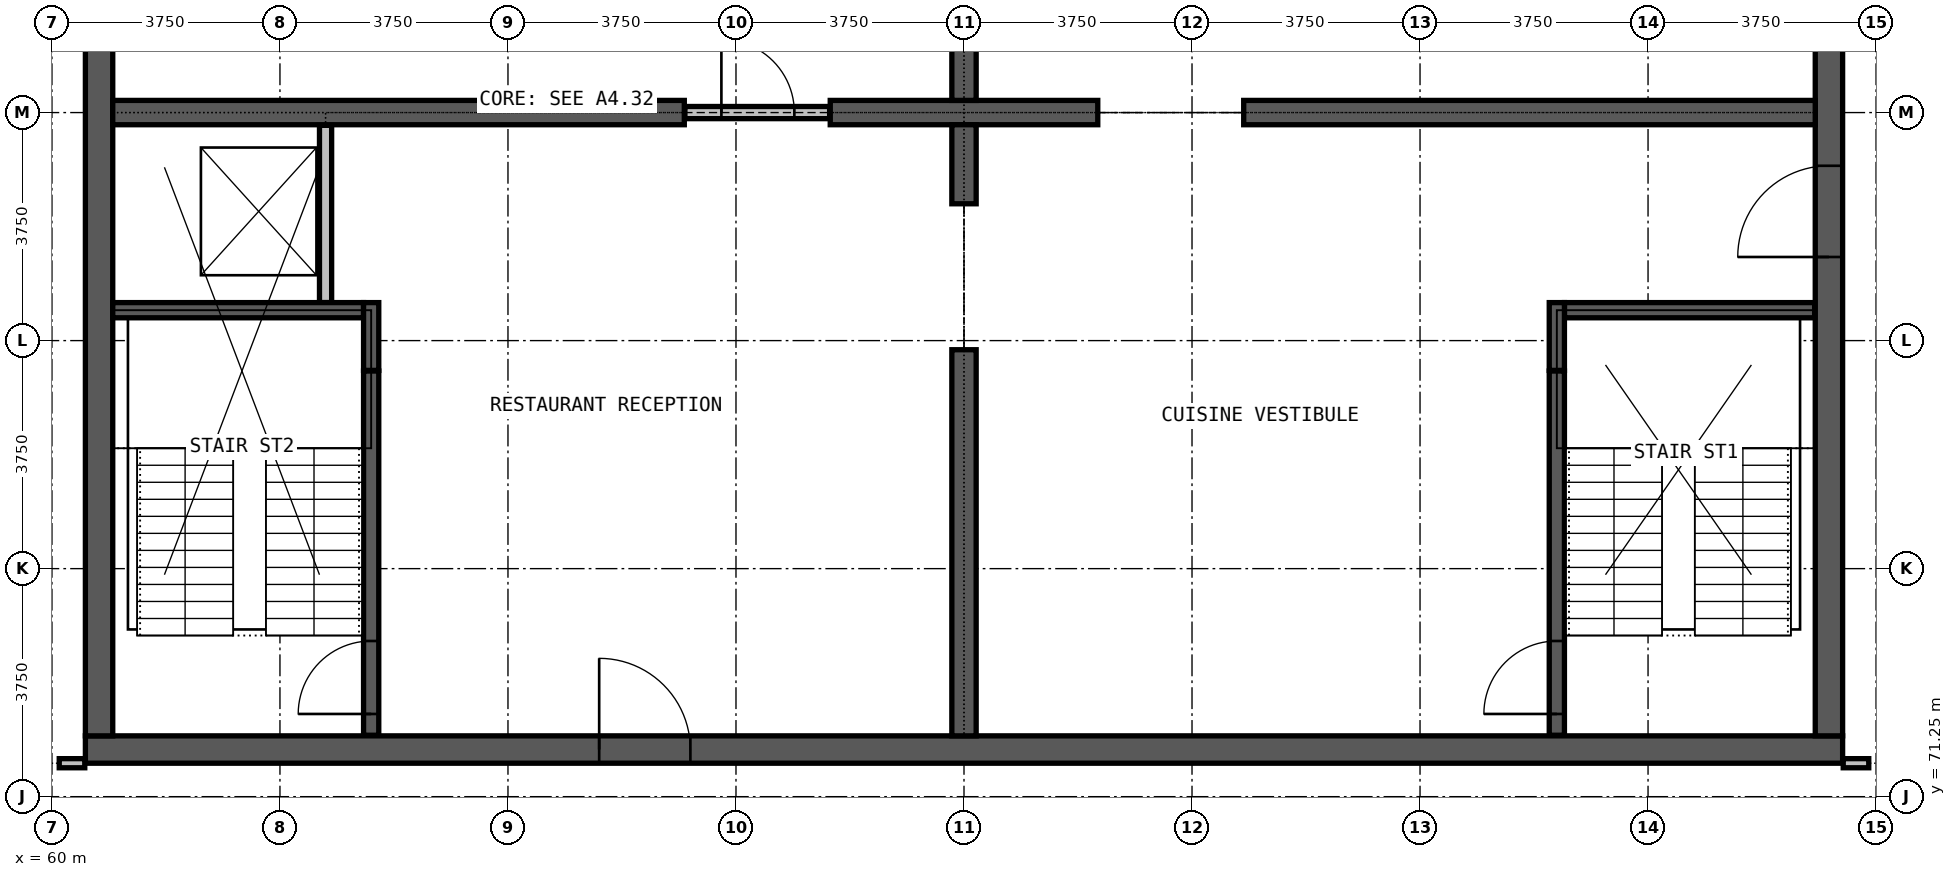
"""IFC4 building model, lengths in metres.
Left out: names, types, materials, properties, quantities, classifications, styles, units other than length and angle.
Written with IfcOpenShell. Run it as: python <this file> out.ifc"""

import sys

from ifc_helpers import new_model, si_unit, direction, frame, frame_2d, origin, place, context, subcontext, project, spatial, rectangle, extrude, element, fill, save


model = new_model("IFC4")
c1 = context("Model", 3, precision=1e-05, world=origin(), true_north=direction((0.0, 1.0)))
c2 = subcontext(c1, "Body", "Model", "MODEL_VIEW")
j1 = project(units=[si_unit("LENGTHUNIT", "METRE"), si_unit("PLANEANGLEUNIT", "RADIAN")], contexts=[c1])
p1 = place(None, origin())
s1 = spatial("IfcSite", under=j1, at=p1, CompositionType="ELEMENT")
p2 = place(p1, origin())
s2 = spatial("IfcBuilding", under=s1, at=p2, CompositionType="ELEMENT")
p3 = place(p2, frame((0.0, 0.0, 283.7)))
s3 = spatial("IfcBuildingStorey", under=s2, at=p3, CompositionType="ELEMENT", Elevation=283.7)
p4 = place(p3, frame((60.55, 72.025, 0.0), z_axis=(0.0, 0.0, 1.0), x_axis=(1.0, 0.0, 0.0)))
e1 = element("IfcWall", 1, at=p4, inside=s3, PredefinedType="SHEAR", context=c2, shape_type="SweptSolid", body=[
    extrude(rectangle(XDim=28.9, YDim=0.45, at=frame_2d((14.45, 0.0))), origin(), (0.0, 0.0, 1.0), 4.0),
])
p5 = place(p4, frame((8.45, 0.0, 0.0)))
e2 = element("IfcOpeningElement", 2, at=p5, cuts=e1, PredefinedType="OPENING", context=c2, shape_type="SweptSolid", body=[
    extrude(rectangle(XDim=1.5, YDim=2.2, at=frame_2d((0.75, 1.1))), frame((0.0, 0.235, 0.0), z_axis=(0.0, -1.0, 0.0), x_axis=(1.0, 0.0, 0.0)), (0.0, 0.0, 1.0), 0.47),
])
p6 = place(p3, frame((89.225, 72.25, 0.0), z_axis=(0.0, 0.0, 1.0), x_axis=(0.0, 1.0, 0.0)))
e3 = element("IfcWall", 3, at=p6, inside=s3, PredefinedType="SHEAR", context=c2, shape_type="SweptSolid", body=[
    extrude(rectangle(XDim=20.5, YDim=0.45, at=frame_2d((10.25, 0.0))), origin(), (0.0, 0.0, 1.0), 4.0),
])
p7 = place(p6, frame((7.875, 0.0, 0.0)))
e4 = element("IfcOpeningElement", 4, at=p7, cuts=e3, PredefinedType="OPENING", context=c2, shape_type="SweptSolid", body=[
    extrude(rectangle(XDim=1.5, YDim=2.2, at=frame_2d((0.75, 1.1))), frame((0.0, 0.235, 0.0), z_axis=(0.0, -1.0, 0.0), x_axis=(1.0, 0.0, 0.0)), (0.0, 0.0, 1.0), 0.47),
])
p8 = place(p3, frame((60.775, 92.75, 0.0), z_axis=(0.0, 0.0, 1.0), x_axis=(0.0, -1.0, 0.0)))
e5 = element("IfcWall", 5, at=p8, inside=s3, PredefinedType="SHEAR", context=c2, shape_type="SweptSolid", body=[
    extrude(rectangle(XDim=20.5, YDim=0.45, at=frame_2d((10.25, 0.0))), origin(), (0.0, 0.0, 1.0), 4.0),
])
p9 = place(p8, frame((8.025, 0.0, 0.0)))
e6 = element("IfcOpeningElement", 6, at=p9, cuts=e5, PredefinedType="OPENING", context=c2, shape_type="SweptSolid", body=[
    extrude(rectangle(XDim=1.2, YDim=2.2, at=frame_2d((0.6, 1.1))), frame((0.0, 0.235, 0.0), z_axis=(0.0, -1.0, 0.0), x_axis=(1.0, 0.0, 0.0)), (0.0, 0.0, 1.0), 0.47),
])
p10 = place(p3, frame((61.0, 82.5, 0.0), z_axis=(0.0, 0.0, 1.0), x_axis=(1.0, 0.0, 0.0)))
e7 = element("IfcWall", 7, at=p10, inside=s3, PredefinedType="SHEAR", context=c2, shape_type="SweptSolid", body=[
    extrude(rectangle(XDim=9.4, YDim=0.4, at=frame_2d((4.7, 0.0))), origin(), (0.0, 0.0, 1.0), 4.0),
])
p11 = place(p3, frame((72.8, 82.5, 0.0), z_axis=(0.0, 0.0, 1.0), x_axis=(1.0, 0.0, 0.0)))
e8 = element("IfcWall", 8, at=p11, inside=s3, PredefinedType="SHEAR", context=c2, shape_type="SweptSolid", body=[
    extrude(rectangle(XDim=4.4, YDim=0.4, at=frame_2d((2.2, 0.0))), origin(), (0.0, 0.0, 1.0), 4.0),
])
p12 = place(p3, frame((79.6, 82.5, 0.0), z_axis=(0.0, 0.0, 1.0), x_axis=(1.0, 0.0, 0.0)))
e9 = element("IfcWall", 9, at=p12, inside=s3, PredefinedType="SHEAR", context=c2, shape_type="SweptSolid", body=[
    extrude(rectangle(XDim=9.4, YDim=0.4, at=frame_2d((4.7, 0.0))), origin(), (0.0, 0.0, 1.0), 4.0),
])
p13 = place(p3, frame((75.0, 72.25, 0.0), z_axis=(0.0, 0.0, 1.0), x_axis=(0.0, 1.0, 0.0)))
e10 = element("IfcWall", 10, at=p13, inside=s3, PredefinedType="SHEAR", context=c2, shape_type="SweptSolid", body=[
    extrude(rectangle(XDim=6.35, YDim=0.4, at=frame_2d((3.175, 0.0))), origin(), (0.0, 0.0, 1.0), 4.0),
])
for number, where, z_axis, x_axis in (
    (11, (75.0, 81.0, 0.0), (0.0, 0.0, 1.0), (0.0, 1.0, 0.0)),
    (12, (75.0, 82.7, 0.0), (0.0, 0.0, 1.0), (0.0, 1.0, 0.0)),
):
    element("IfcWall", number, at=place(p3, frame(where, z_axis=z_axis, x_axis=x_axis)), inside=s3, PredefinedType="SHEAR", context=c2, shape_type="SweptSolid", body=[
        extrude(rectangle(XDim=1.3, YDim=0.4, at=frame_2d((0.65, 0.0))), origin(), (0.0, 0.0, 1.0), 4.0),
    ])
p14 = place(p3, frame((70.41, 82.5, 0.0), z_axis=(0.0, 0.0, 1.0), x_axis=(1.0, 0.0, 0.0)))
e13 = element("IfcWall", 13, at=p14, inside=s3, PredefinedType="PARTITIONING", context=c2, shape_type="SweptSolid", body=[
    extrude(rectangle(XDim=2.38, YDim=0.2, at=frame_2d((1.19, 0.0))), origin(), (0.0, 0.0, 1.0), 2.4),
])
p15 = place(p14, frame((0.6, 0.0, 0.0)))
e14 = element("IfcOpeningElement", 14, at=p15, cuts=e13, PredefinedType="OPENING", context=c2, shape_type="SweptSolid", body=[
    extrude(rectangle(XDim=1.2, YDim=2.2, at=frame_2d((0.6, 1.1))), frame((0.0, 0.11, 0.0), z_axis=(0.0, -1.0, 0.0), x_axis=(1.0, 0.0, 0.0)), (0.0, 0.0, 1.0), 0.22),
])
for number, where, z_axis, x_axis in (
    (15, (60.12, 71.8, 0.0), (0.0, 0.0, 1.0), (1.0, 0.0, 0.0)),
    (16, (89.46, 71.8, 0.0), (0.0, 0.0, 1.0), (1.0, 0.0, 0.0)),
):
    element("IfcWall", number, at=place(p3, frame(where, z_axis=z_axis, x_axis=x_axis)), inside=s3, PredefinedType="PARTITIONING", context=c2, shape_type="SweptSolid", body=[
        extrude(rectangle(XDim=0.42, YDim=0.15, at=frame_2d((0.21, 0.0))), origin(), (0.0, 0.0, 1.0), 3.65),
    ])
p16 = place(p3, frame((64.5, 79.375, 0.0), z_axis=(0.0, 0.0, 1.0), x_axis=(0.0, 1.0, 0.0)))
e17 = element("IfcWall", 17, at=p16, inside=s3, PredefinedType="PARTITIONING", context=c2, shape_type="SweptSolid", body=[
    extrude(rectangle(XDim=2.915, YDim=0.2, at=frame_2d((1.458, 0.0))), origin(), (0.0, 0.0, 1.0), 3.65),
])
p17 = place(p3, frame((61.0, 79.25, 0.0), z_axis=(0.0, 0.0, 1.0), x_axis=(1.0, 0.0, 0.0)))
e18 = element("IfcWall", 18, at=p17, inside=s3, PredefinedType="PARTITIONING", context=c2, shape_type="SweptSolid", body=[
    extrude(rectangle(XDim=4.125, YDim=0.25, at=frame_2d((2.062, 0.0))), origin(), (0.0, 0.0, 1.0), 3.65),
])
p18 = place(p3, frame((84.875, 79.25, 0.0), z_axis=(0.0, 0.0, 1.0), x_axis=(1.0, 0.0, 0.0)))
e19 = element("IfcWall", 19, at=p18, inside=s3, PredefinedType="PARTITIONING", context=c2, shape_type="SweptSolid", body=[
    extrude(rectangle(XDim=4.115, YDim=0.25, at=frame_2d((2.058, 0.0))), origin(), (0.0, 0.0, 1.0), 3.65),
])
p19 = place(p3, frame((65.25, 72.26, 0.0), z_axis=(0.0, 0.0, 1.0), x_axis=(0.0, 1.0, 0.0)))
e20 = element("IfcWall", 20, at=p19, inside=s3, PredefinedType="PARTITIONING", context=c2, shape_type="SweptSolid", body=[
    extrude(rectangle(XDim=5.99, YDim=0.25, at=frame_2d((2.995, 0.0))), origin(), (0.0, 0.0, 1.0), 3.65),
])
p20 = place(p19, frame((0.35, 0.0, 0.0)))
e21 = element("IfcOpeningElement", 21, at=p20, cuts=e20, PredefinedType="OPENING", context=c2, shape_type="SweptSolid", body=[
    extrude(rectangle(XDim=1.2, YDim=2.2, at=frame_2d((0.6, 1.1))), frame((0.0, 0.135, 0.0), z_axis=(0.0, -1.0, 0.0), x_axis=(1.0, 0.0, 0.0)), (0.0, 0.0, 1.0), 0.27),
])
p21 = place(p3, frame((65.25, 78.26, 0.0), z_axis=(0.0, 0.0, 1.0), x_axis=(0.0, 1.0, 0.0)))
e22 = element("IfcWall", 22, at=p21, inside=s3, PredefinedType="PARTITIONING", context=c2, shape_type="SweptSolid", body=[
    extrude(rectangle(XDim=1.115, YDim=0.25, at=frame_2d((0.558, 0.0))), origin(), (0.0, 0.0, 1.0), 3.65),
])
p22 = place(p3, frame((84.75, 72.26, 0.0), z_axis=(0.0, 0.0, 1.0), x_axis=(0.0, 1.0, 0.0)))
e23 = element("IfcWall", 23, at=p22, inside=s3, PredefinedType="PARTITIONING", context=c2, shape_type="SweptSolid", body=[
    extrude(rectangle(XDim=5.99, YDim=0.25, at=frame_2d((2.995, 0.0))), origin(), (0.0, 0.0, 1.0), 3.65),
])
p23 = place(p22, frame((0.35, 0.0, 0.0)))
e24 = element("IfcOpeningElement", 24, at=p23, cuts=e23, PredefinedType="OPENING", context=c2, shape_type="SweptSolid", body=[
    extrude(rectangle(XDim=1.2, YDim=2.2, at=frame_2d((0.6, 1.1))), frame((0.0, 0.135, 0.0), z_axis=(0.0, -1.0, 0.0), x_axis=(1.0, 0.0, 0.0)), (0.0, 0.0, 1.0), 0.27),
])
p24 = place(p3, frame((84.75, 78.26, 0.0), z_axis=(0.0, 0.0, 1.0), x_axis=(0.0, 1.0, 0.0)))
e25 = element("IfcWall", 25, at=p24, inside=s3, PredefinedType="PARTITIONING", context=c2, shape_type="SweptSolid", body=[
    extrude(rectangle(XDim=1.115, YDim=0.25, at=frame_2d((0.558, 0.0))), origin(), (0.0, 0.0, 1.0), 3.65),
])
p25 = place(p15, origin())
e26 = element("IfcDoor", 26, at=p25, inside=s3, OperationType="SINGLE_SWING_LEFT", PredefinedType="DOOR", context=c2, shape_type="SweptSolid", body=[
    extrude(rectangle(XDim=1.2, YDim=2.2, at=frame_2d((0.6, 1.1))), frame((0.0, 0.025, 0.0), z_axis=(0.0, -1.0, 0.0), x_axis=(1.0, 0.0, 0.0)), (0.0, 0.0, 1.0), 0.05),
])
fill(e14, e26)
p26 = place(p20, origin())
e27 = element("IfcDoor", 27, at=p26, inside=s3, OperationType="SINGLE_SWING_LEFT", PredefinedType="DOOR", context=c2, shape_type="SweptSolid", body=[
    extrude(rectangle(XDim=1.2, YDim=2.2, at=frame_2d((0.6, 1.1))), frame((0.0, 0.025, 0.0), z_axis=(0.0, -1.0, 0.0), x_axis=(1.0, 0.0, 0.0)), (0.0, 0.0, 1.0), 0.05),
])
fill(e21, e27)
p27 = place(p23, origin())
e28 = element("IfcDoor", 28, at=p27, inside=s3, OperationType="SINGLE_SWING_LEFT", PredefinedType="DOOR", context=c2, shape_type="SweptSolid", body=[
    extrude(rectangle(XDim=1.2, YDim=2.2, at=frame_2d((0.6, 1.1))), frame((0.0, 0.025, 0.0), z_axis=(0.0, -1.0, 0.0), x_axis=(1.0, 0.0, 0.0)), (0.0, 0.0, 1.0), 0.05),
])
fill(e24, e28)
p28 = place(p5, origin())
e29 = element("IfcDoor", 29, at=p28, inside=s3, OperationType="DOUBLE_DOOR_SINGLE_SWING", PredefinedType="DOOR", context=c2, shape_type="SweptSolid", body=[
    extrude(rectangle(XDim=1.5, YDim=2.2, at=frame_2d((0.75, 1.1))), frame((0.0, 0.025, 0.0), z_axis=(0.0, -1.0, 0.0), x_axis=(1.0, 0.0, 0.0)), (0.0, 0.0, 1.0), 0.05),
])
fill(e2, e29)
p29 = place(p7, origin())
e30 = element("IfcDoor", 30, at=p29, inside=s3, OperationType="DOUBLE_DOOR_SINGLE_SWING", PredefinedType="DOOR", context=c2, shape_type="SweptSolid", body=[
    extrude(rectangle(XDim=1.5, YDim=2.2, at=frame_2d((0.75, 1.1))), frame((0.0, 0.025, 0.0), z_axis=(0.0, -1.0, 0.0), x_axis=(1.0, 0.0, 0.0)), (0.0, 0.0, 1.0), 0.05),
])
fill(e4, e30)
save(model, sys.argv[1])
